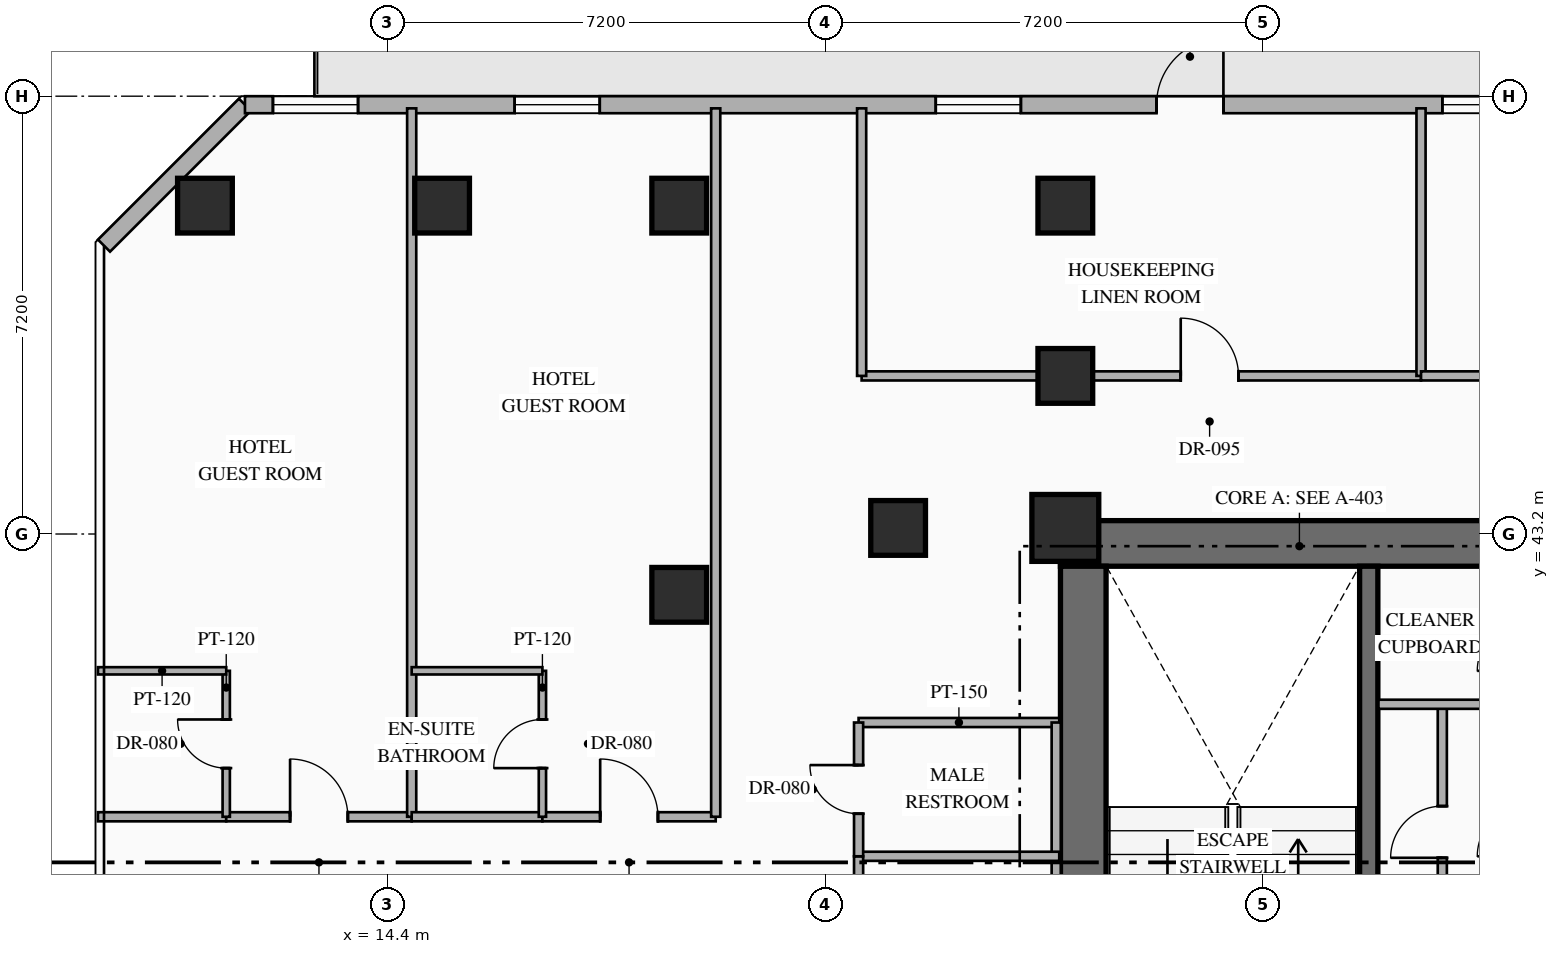
"""IFC4 building model, lengths in metres.
Left out: names, types, materials, properties, quantities, classifications, styles, units other than length and angle.
Written with IfcOpenShell. Run it as: python <this file> out.ifc"""

import sys

from ifc_helpers import new_model, si_unit, direction, frame, frame_2d, origin, origin_2d, place, context, subcontext, project, spatial, rectangle, hollow_rectangle, extrude, element, fill, save


model = new_model("IFC4")
c1 = context("Model", 3, precision=1e-05, world=origin(), true_north=direction((0.0, 1.0)))
c2 = subcontext(c1, "Body", "Model", "MODEL_VIEW")
j1 = project(units=[si_unit("LENGTHUNIT", "METRE"), si_unit("PLANEANGLEUNIT", "RADIAN")], contexts=[c1])
p1 = place(None, origin())
s1 = spatial("IfcSite", under=j1, at=p1, CompositionType="ELEMENT")
p2 = place(p1, origin())
s2 = spatial("IfcBuilding", under=s1, at=p2, CompositionType="ELEMENT")
p3 = place(p2, frame((0.0, 0.0, 74.6)))
s3 = spatial("IfcBuildingStorey", under=s2, at=p3, CompositionType="ELEMENT", Elevation=74.6)
p4 = place(p3, frame((25.47, 43.045, 0.0), z_axis=(0.0, 0.0, 1.0), x_axis=(1.0, 0.0, 0.0)))
e1 = element("IfcWall", 1, at=p4, inside=s3, PredefinedType="SHEAR", context=c2, shape_type="SweptSolid", body=[
    extrude(rectangle(XDim=8.08, YDim=0.75, at=frame_2d((4.04, 0.0))), origin(), (0.0, 0.0, 1.0), 3.35),
])
p5 = place(p3, frame((25.845, 33.19, 0.0), z_axis=(0.0, 0.0, 1.0), x_axis=(0.0, 1.0, 0.0)))
e2 = element("IfcWall", 2, at=p5, inside=s3, PredefinedType="SHEAR", context=c2, shape_type="SweptSolid", body=[
    extrude(rectangle(XDim=9.48, YDim=0.75, at=frame_2d((4.74, 0.0))), origin(), (0.0, 0.0, 1.0), 3.35),
])
p6 = place(p3, frame((30.54, 33.19, 0.0), z_axis=(0.0, 0.0, 1.0), x_axis=(0.0, 1.0, 0.0)))
e3 = element("IfcWall", 3, at=p6, inside=s3, PredefinedType="SHEAR", context=c2, shape_type="SweptSolid", body=[
    extrude(rectangle(XDim=9.48, YDim=0.3, at=frame_2d((4.74, 0.0))), origin(), (0.0, 0.0, 1.0), 3.35),
])
p7 = place(p3, frame((25.55, 43.3, 0.0), z_axis=(0.0, 0.0, 1.0), x_axis=(1.0, 0.0, 0.0)))
e4 = element("IfcColumn", 4, at=p7, inside=s3, PredefinedType="COLUMN", context=c2, shape_type="SweptSolid", body=[
    extrude(rectangle(XDim=1.1, YDim=1.1, at=origin_2d()), origin(), (0.0, 0.0, 1.0), 3.35),
])
for number, where, z_axis, x_axis in (
    (5, (25.55, 45.8, 0.0), (0.0, 0.0, 1.0), (1.0, 0.0, 0.0)),
    (6, (11.4, 48.6, 0.0), (0.0, 0.0, 1.0), (1.0, 0.0, 0.0)),
    (7, (19.2, 48.6, 0.0), (0.0, 0.0, 1.0), (1.0, 0.0, 0.0)),
    (8, (25.55, 48.6, 0.0), (0.0, 0.0, 1.0), (1.0, 0.0, 0.0)),
    (9, (19.2, 42.2, 0.0), (0.0, 0.0, 1.0), (1.0, 0.0, 0.0)),
    (10, (22.8, 43.3, 0.0), (0.0, 0.0, 1.0), (1.0, 0.0, 0.0)),
    (11, (15.3, 48.6, 0.0), (0.0, 0.0, 1.0), (1.0, 0.0, 0.0)),
):
    element("IfcColumn", number, at=place(p3, frame(where, z_axis=z_axis, x_axis=x_axis)), inside=s3, PredefinedType="COLUMN", context=c2, shape_type="SweptSolid", body=[
        extrude(hollow_rectangle(XDim=0.9, YDim=0.9, WallThickness=0.036, at=origin_2d()), origin(), (0.0, 0.0, 1.0), 3.35),
    ])
p8 = place(p3, frame((9.74, 47.942, 0.0), z_axis=(0.0, 0.0, 1.0), x_axis=(0.707106781187, 0.707106781187, 0.0)))
e12 = element("IfcWall", 12, at=p8, inside=s3, PredefinedType="STANDARD", context=c2, shape_type="SweptSolid", body=[
    extrude(rectangle(XDim=3.278, YDim=0.28, at=frame_2d((1.639, 0.0))), origin(), (0.0, 0.0, 1.0), 3.13),
])
p9 = place(p3, frame((12.058, 50.26, 0.0), z_axis=(0.0, 0.0, 1.0), x_axis=(1.0, 0.0, 0.0)))
e13 = element("IfcWall", 13, at=p9, inside=s3, PredefinedType="STANDARD", context=c2, shape_type="SweptSolid", body=[
    extrude(rectangle(XDim=30.484, YDim=0.28, at=frame_2d((15.242, 0.0))), origin(), (0.0, 0.0, 1.0), 3.13),
])
p10 = place(p9, frame((14.992, 0.0, 0.0)))
e14 = element("IfcOpeningElement", 14, at=p10, cuts=e13, PredefinedType="OPENING", context=c2, shape_type="SweptSolid", body=[
    extrude(rectangle(XDim=1.1, YDim=2.2, at=frame_2d((0.55, 1.1))), frame((0.0, 0.15, 0.0), z_axis=(0.0, -1.0, 0.0), x_axis=(1.0, 0.0, 0.0)), (0.0, 0.0, 1.0), 0.3),
])
p11 = place(p9, frame((0.46, 0.0, 0.85)))
e15 = element("IfcOpeningElement", 15, at=p11, cuts=e13, PredefinedType="OPENING", context=c2, shape_type="SweptSolid", body=[
    extrude(rectangle(XDim=1.4, YDim=1.8, at=frame_2d((0.7, 0.9))), frame((0.0, 0.15, 0.0), z_axis=(0.0, -1.0, 0.0), x_axis=(1.0, 0.0, 0.0)), (0.0, 0.0, 1.0), 0.3),
])
p12 = place(p9, frame((4.435, 0.0, 0.85)))
e16 = element("IfcOpeningElement", 16, at=p12, cuts=e13, PredefinedType="OPENING", context=c2, shape_type="SweptSolid", body=[
    extrude(rectangle(XDim=1.4, YDim=1.8, at=frame_2d((0.7, 0.9))), frame((0.0, 0.15, 0.0), z_axis=(0.0, -1.0, 0.0), x_axis=(1.0, 0.0, 0.0)), (0.0, 0.0, 1.0), 0.3),
])
p13 = place(p9, frame((11.361, 0.0, 0.85)))
e17 = element("IfcOpeningElement", 17, at=p13, cuts=e13, PredefinedType="OPENING", context=c2, shape_type="SweptSolid", body=[
    extrude(rectangle(XDim=1.4, YDim=1.8, at=frame_2d((0.7, 0.9))), frame((0.0, 0.15, 0.0), z_axis=(0.0, -1.0, 0.0), x_axis=(1.0, 0.0, 0.0)), (0.0, 0.0, 1.0), 0.3),
])
p14 = place(p9, frame((19.693, 0.0, 0.85)))
e18 = element("IfcOpeningElement", 18, at=p14, cuts=e13, PredefinedType="OPENING", context=c2, shape_type="SweptSolid", body=[
    extrude(rectangle(XDim=1.4, YDim=1.8, at=frame_2d((0.7, 0.9))), frame((0.0, 0.15, 0.0), z_axis=(0.0, -1.0, 0.0), x_axis=(1.0, 0.0, 0.0)), (0.0, 0.0, 1.0), 0.3),
])
p15 = place(p9, frame((23.252, 0.0, 0.85)))
e19 = element("IfcOpeningElement", 19, at=p15, cuts=e13, PredefinedType="OPENING", context=c2, shape_type="SweptSolid", body=[
    extrude(rectangle(XDim=1.4, YDim=1.8, at=frame_2d((0.7, 0.9))), frame((0.0, 0.15, 0.0), z_axis=(0.0, -1.0, 0.0), x_axis=(1.0, 0.0, 0.0)), (0.0, 0.0, 1.0), 0.3),
])
p16 = place(p9, frame((27.417, 0.0, 0.85)))
e20 = element("IfcOpeningElement", 20, at=p16, cuts=e13, PredefinedType="OPENING", context=c2, shape_type="SweptSolid", body=[
    extrude(rectangle(XDim=1.4, YDim=1.8, at=frame_2d((0.7, 0.9))), frame((0.0, 0.15, 0.0), z_axis=(0.0, -1.0, 0.0), x_axis=(1.0, 0.0, 0.0)), (0.0, 0.0, 1.0), 0.3),
])
p17 = place(p3, frame((31.75, 36.18, 0.0), z_axis=(0.0, 0.0, 1.0), x_axis=(0.0, 1.0, 0.0)))
e21 = element("IfcWall", 21, at=p17, inside=s3, PredefinedType="PARTITIONING", context=c2, shape_type="SweptSolid", body=[
    extrude(rectangle(XDim=4.24, YDim=0.15, at=frame_2d((2.12, 0.0))), origin(), (0.0, 0.0, 1.0), 3.13),
])
p18 = place(p17, frame((1.695, 0.0, 0.0)))
e22 = element("IfcOpeningElement", 22, at=p18, cuts=e21, PredefinedType="OPENING", context=c2, shape_type="SweptSolid", body=[
    extrude(rectangle(XDim=0.85, YDim=2.08, at=frame_2d((0.425, 1.04))), frame((0.0, 0.085, 0.0), z_axis=(0.0, -1.0, 0.0), x_axis=(1.0, 0.0, 0.0)), (0.0, 0.0, 1.0), 0.17),
])
p19 = place(p3, frame((30.7, 40.4, 0.0), z_axis=(0.0, 0.0, 1.0), x_axis=(1.0, 0.0, 0.0)))
e23 = element("IfcWall", 23, at=p19, inside=s3, PredefinedType="PARTITIONING", context=c2, shape_type="SweptSolid", body=[
    extrude(rectangle(XDim=2.1, YDim=0.15, at=frame_2d((1.05, 0.0))), origin(), (0.0, 0.0, 1.0), 3.13),
])
p20 = place(p3, frame((22.15, 40.1, 0.0), z_axis=(0.0, 0.0, 1.0), x_axis=(1.0, 0.0, 0.0)))
e24 = element("IfcWall", 24, at=p20, inside=s3, PredefinedType="PARTITIONING", context=c2, shape_type="SweptSolid", body=[
    extrude(rectangle(XDim=3.3, YDim=0.15, at=frame_2d((1.65, 0.0))), origin(), (0.0, 0.0, 1.0), 3.13),
])
p21 = place(p3, frame((25.4, 33.5, 0.0), z_axis=(0.0, 0.0, 1.0), x_axis=(0.0, 1.0, 0.0)))
e25 = element("IfcWall", 25, at=p21, inside=s3, PredefinedType="PARTITIONING", context=c2, shape_type="SweptSolid", body=[
    extrude(rectangle(XDim=6.6, YDim=0.15, at=frame_2d((3.3, 0.0))), origin(), (0.0, 0.0, 1.0), 3.13),
])
p22 = place(p3, frame((22.15, 37.9, 0.0), z_axis=(0.0, 0.0, 1.0), x_axis=(1.0, 0.0, 0.0)))
e26 = element("IfcWall", 26, at=p22, inside=s3, PredefinedType="PARTITIONING", context=c2, shape_type="SweptSolid", body=[
    extrude(rectangle(XDim=3.3, YDim=0.15, at=frame_2d((1.65, 0.0))), origin(), (0.0, 0.0, 1.0), 3.13),
])
p23 = place(p3, frame((22.15, 35.7, 0.0), z_axis=(0.0, 0.0, 1.0), x_axis=(0.0, 1.0, 0.0)))
e27 = element("IfcWall", 27, at=p23, inside=s3, PredefinedType="PARTITIONING", context=c2, shape_type="SweptSolid", body=[
    extrude(rectangle(XDim=2.2, YDim=0.15, at=frame_2d((1.1, 0.0))), origin(), (0.0, 0.0, 1.0), 3.13),
])
p24 = place(p23, frame((0.7, 0.0, 0.0)))
e28 = element("IfcOpeningElement", 28, at=p24, cuts=e27, PredefinedType="OPENING", context=c2, shape_type="SweptSolid", body=[
    extrude(rectangle(XDim=0.8, YDim=2.06, at=frame_2d((0.4, 1.03))), frame((0.0, 0.085, 0.0), z_axis=(0.0, -1.0, 0.0), x_axis=(1.0, 0.0, 0.0)), (0.0, 0.0, 1.0), 0.17),
])
p25 = place(p3, frame((22.15, 37.9, 0.0), z_axis=(0.0, 0.0, 1.0), x_axis=(0.0, 1.0, 0.0)))
e29 = element("IfcWall", 29, at=p25, inside=s3, PredefinedType="PARTITIONING", context=c2, shape_type="SweptSolid", body=[
    extrude(rectangle(XDim=2.2, YDim=0.15, at=frame_2d((1.1, 0.0))), origin(), (0.0, 0.0, 1.0), 3.13),
])
p26 = place(p25, frame((0.7, 0.0, 0.0)))
e30 = element("IfcOpeningElement", 30, at=p26, cuts=e29, PredefinedType="OPENING", context=c2, shape_type="SweptSolid", body=[
    extrude(rectangle(XDim=0.8, YDim=2.06, at=frame_2d((0.4, 1.03))), frame((0.0, 0.085, 0.0), z_axis=(0.0, -1.0, 0.0), x_axis=(1.0, 0.0, 0.0)), (0.0, 0.0, 1.0), 0.17),
])
p27 = place(p3, frame((22.2, 45.8, 0.0), z_axis=(0.0, 0.0, 1.0), x_axis=(1.0, 0.0, 0.0)))
e31 = element("IfcWall", 31, at=p27, inside=s3, PredefinedType="PARTITIONING", context=c2, shape_type="SweptSolid", body=[
    extrude(rectangle(XDim=9.2, YDim=0.15, at=frame_2d((4.6, 0.0))), origin(), (0.0, 0.0, 1.0), 2.425),
])
p28 = place(p27, frame((5.248, 0.0, 0.0)))
e32 = element("IfcOpeningElement", 32, at=p28, cuts=e31, PredefinedType="OPENING", context=c2, shape_type="SweptSolid", body=[
    extrude(rectangle(XDim=0.95, YDim=2.15, at=frame_2d((0.475, 1.075))), frame((0.0, 0.085, 0.0), z_axis=(0.0, -1.0, 0.0), x_axis=(1.0, 0.0, 0.0)), (0.0, 0.0, 1.0), 0.17),
])
for number, where, z_axis, x_axis in (
    (33, (22.2, 45.8, 0.0), (0.0, 0.0, 1.0), (0.0, 1.0, 0.0)),
    (34, (31.4, 45.8, 0.0), (0.0, 0.0, 1.0), (0.0, 1.0, 0.0)),
):
    element("IfcWall", number, at=place(p3, frame(where, z_axis=z_axis, x_axis=x_axis)), inside=s3, PredefinedType="PARTITIONING", context=c2, shape_type="SweptSolid", body=[
        extrude(rectangle(XDim=4.4, YDim=0.15, at=frame_2d((2.2, 0.0))), origin(), (0.0, 0.0, 1.0), 3.13),
    ])
p29 = place(p3, frame((31.4, 45.8, 0.0), z_axis=(0.0, 0.0, 1.0), x_axis=(1.0, 0.0, 0.0)))
e35 = element("IfcWall", 35, at=p29, inside=s3, PredefinedType="PARTITIONING", context=c2, shape_type="SweptSolid", body=[
    extrude(rectangle(XDim=13.0, YDim=0.15, at=frame_2d((6.5, 0.0))), origin(), (0.0, 0.0, 1.0), 2.425),
])
p30 = place(p29, frame((6.025, 0.0, 0.0)))
e36 = element("IfcOpeningElement", 36, at=p30, cuts=e35, PredefinedType="OPENING", context=c2, shape_type="SweptSolid", body=[
    extrude(rectangle(XDim=0.95, YDim=2.15, at=frame_2d((0.475, 1.075))), frame((0.0, 0.085, 0.0), z_axis=(0.0, -1.0, 0.0), x_axis=(1.0, 0.0, 0.0)), (0.0, 0.0, 1.0), 0.17),
])
p31 = place(p3, frame((9.64, 38.55, 0.0), z_axis=(0.0, 0.0, 1.0), x_axis=(1.0, 0.0, 0.0)))
e37 = element("IfcWall", 37, at=p31, inside=s3, PredefinedType="PARTITIONING", context=c2, shape_type="SweptSolid", body=[
    extrude(rectangle(XDim=2.11, YDim=0.15, at=frame_2d((1.055, 0.0))), origin(), (0.0, 0.0, 1.0), 2.775),
])
p32 = place(p3, frame((11.75, 38.55, 0.0), z_axis=(0.0, 0.0, 1.0), x_axis=(1.0, 0.0, 0.0)))
e38 = element("IfcWall", 38, at=p32, inside=s3, PredefinedType="PARTITIONING", context=c2, shape_type="SweptSolid", body=[
    extrude(rectangle(XDim=3.05, YDim=0.15, at=frame_2d((1.525, 0.0))), origin(), (0.0, 0.0, 1.0), 2.775),
])
p33 = place(p32, frame((1.05, 0.0, 0.0)))
e39 = element("IfcOpeningElement", 39, at=p33, cuts=e38, PredefinedType="OPENING", context=c2, shape_type="SweptSolid", body=[
    extrude(rectangle(XDim=0.95, YDim=2.15, at=frame_2d((0.475, 1.075))), frame((0.0, 0.085, 0.0), z_axis=(0.0, -1.0, 0.0), x_axis=(1.0, 0.0, 0.0)), (0.0, 0.0, 1.0), 0.17),
])
p34 = place(p3, frame((11.75, 38.55, 0.0), z_axis=(0.0, 0.0, 1.0), x_axis=(0.0, 1.0, 0.0)))
e40 = element("IfcWall", 40, at=p34, inside=s3, PredefinedType="PARTITIONING", context=c2, shape_type="SweptSolid", body=[
    extrude(rectangle(XDim=2.4, YDim=0.12, at=frame_2d((1.2, 0.0))), origin(), (0.0, 0.0, 1.0), 3.13),
])
p35 = place(p34, frame((0.8, 0.0, 0.0)))
e41 = element("IfcOpeningElement", 41, at=p35, cuts=e40, PredefinedType="OPENING", context=c2, shape_type="SweptSolid", body=[
    extrude(rectangle(XDim=0.8, YDim=2.06, at=frame_2d((0.4, 1.03))), frame((0.0, 0.07, 0.0), z_axis=(0.0, -1.0, 0.0), x_axis=(1.0, 0.0, 0.0)), (0.0, 0.0, 1.0), 0.14),
])
p36 = place(p3, frame((9.64, 40.95, 0.0), z_axis=(0.0, 0.0, 1.0), x_axis=(1.0, 0.0, 0.0)))
e42 = element("IfcWall", 42, at=p36, inside=s3, PredefinedType="PARTITIONING", context=c2, shape_type="SweptSolid", body=[
    extrude(rectangle(XDim=2.11, YDim=0.12, at=frame_2d((1.055, 0.0))), origin(), (0.0, 0.0, 1.0), 2.775),
])
p37 = place(p3, frame((14.8, 38.55, 0.0), z_axis=(0.0, 0.0, 1.0), x_axis=(0.0, 1.0, 0.0)))
e43 = element("IfcWall", 43, at=p37, inside=s3, PredefinedType="PARTITIONING", context=c2, shape_type="SweptSolid", body=[
    extrude(rectangle(XDim=11.65, YDim=0.15, at=frame_2d((5.825, 0.0))), origin(), (0.0, 0.0, 1.0), 3.13),
])
p38 = place(p3, frame((14.8, 38.55, 0.0), z_axis=(0.0, 0.0, 1.0), x_axis=(1.0, 0.0, 0.0)))
e44 = element("IfcWall", 44, at=p38, inside=s3, PredefinedType="PARTITIONING", context=c2, shape_type="SweptSolid", body=[
    extrude(rectangle(XDim=2.15, YDim=0.15, at=frame_2d((1.075, 0.0))), origin(), (0.0, 0.0, 1.0), 2.775),
])
p39 = place(p3, frame((16.95, 38.55, 0.0), z_axis=(0.0, 0.0, 1.0), x_axis=(1.0, 0.0, 0.0)))
e45 = element("IfcWall", 45, at=p39, inside=s3, PredefinedType="PARTITIONING", context=c2, shape_type="SweptSolid", body=[
    extrude(rectangle(XDim=2.85, YDim=0.15, at=frame_2d((1.425, 0.0))), origin(), (0.0, 0.0, 1.0), 2.775),
])
p40 = place(p39, frame((0.95, 0.0, 0.0)))
e46 = element("IfcOpeningElement", 46, at=p40, cuts=e45, PredefinedType="OPENING", context=c2, shape_type="SweptSolid", body=[
    extrude(rectangle(XDim=0.95, YDim=2.15, at=frame_2d((0.475, 1.075))), frame((0.0, 0.085, 0.0), z_axis=(0.0, -1.0, 0.0), x_axis=(1.0, 0.0, 0.0)), (0.0, 0.0, 1.0), 0.17),
])
p41 = place(p3, frame((16.95, 38.55, 0.0), z_axis=(0.0, 0.0, 1.0), x_axis=(0.0, 1.0, 0.0)))
e47 = element("IfcWall", 47, at=p41, inside=s3, PredefinedType="PARTITIONING", context=c2, shape_type="SweptSolid", body=[
    extrude(rectangle(XDim=2.4, YDim=0.12, at=frame_2d((1.2, 0.0))), origin(), (0.0, 0.0, 1.0), 3.13),
])
p42 = place(p41, frame((0.8, 0.0, 0.0)))
e48 = element("IfcOpeningElement", 48, at=p42, cuts=e47, PredefinedType="OPENING", context=c2, shape_type="SweptSolid", body=[
    extrude(rectangle(XDim=0.8, YDim=2.06, at=frame_2d((0.4, 1.03))), frame((0.0, 0.07, 0.0), z_axis=(0.0, -1.0, 0.0), x_axis=(1.0, 0.0, 0.0)), (0.0, 0.0, 1.0), 0.14),
])
p43 = place(p3, frame((14.8, 40.95, 0.0), z_axis=(0.0, 0.0, 1.0), x_axis=(1.0, 0.0, 0.0)))
e49 = element("IfcWall", 49, at=p43, inside=s3, PredefinedType="PARTITIONING", context=c2, shape_type="SweptSolid", body=[
    extrude(rectangle(XDim=2.15, YDim=0.12, at=frame_2d((1.075, 0.0))), origin(), (0.0, 0.0, 1.0), 2.775),
])
p44 = place(p3, frame((19.8, 38.55, 0.0), z_axis=(0.0, 0.0, 1.0), x_axis=(0.0, 1.0, 0.0)))
e50 = element("IfcWall", 50, at=p44, inside=s3, PredefinedType="PARTITIONING", context=c2, shape_type="SweptSolid", body=[
    extrude(rectangle(XDim=11.65, YDim=0.15, at=frame_2d((5.825, 0.0))), origin(), (0.0, 0.0, 1.0), 3.13),
])
p45 = place(p10, origin())
e51 = element("IfcDoor", 51, at=p45, inside=s3, OperationType="SINGLE_SWING_RIGHT", PredefinedType="DOOR", context=c2, shape_type="SweptSolid", body=[
    extrude(rectangle(XDim=1.1, YDim=2.2, at=frame_2d((0.55, 1.1))), frame((0.0, 0.025, 0.0), z_axis=(0.0, -1.0, 0.0), x_axis=(1.0, 0.0, 0.0)), (0.0, 0.0, 1.0), 0.05),
])
fill(e14, e51)
p46 = place(p11, origin())
e52 = element("IfcWindow", 52, at=p46, inside=s3, PartitioningType="SINGLE_PANEL", PredefinedType="WINDOW", context=c2, shape_type="SweptSolid", body=[
    extrude(rectangle(XDim=1.4, YDim=1.8, at=frame_2d((0.7, 0.9))), frame((0.0, 0.03, 0.0), z_axis=(0.0, -1.0, 0.0), x_axis=(1.0, 0.0, 0.0)), (0.0, 0.0, 1.0), 0.06),
])
fill(e15, e52)
p47 = place(p12, origin())
e53 = element("IfcWindow", 53, at=p47, inside=s3, PartitioningType="SINGLE_PANEL", PredefinedType="WINDOW", context=c2, shape_type="SweptSolid", body=[
    extrude(rectangle(XDim=1.4, YDim=1.8, at=frame_2d((0.7, 0.9))), frame((0.0, 0.03, 0.0), z_axis=(0.0, -1.0, 0.0), x_axis=(1.0, 0.0, 0.0)), (0.0, 0.0, 1.0), 0.06),
])
fill(e16, e53)
p48 = place(p13, origin())
e54 = element("IfcWindow", 54, at=p48, inside=s3, PartitioningType="SINGLE_PANEL", PredefinedType="WINDOW", context=c2, shape_type="SweptSolid", body=[
    extrude(rectangle(XDim=1.4, YDim=1.8, at=frame_2d((0.7, 0.9))), frame((0.0, 0.03, 0.0), z_axis=(0.0, -1.0, 0.0), x_axis=(1.0, 0.0, 0.0)), (0.0, 0.0, 1.0), 0.06),
])
fill(e17, e54)
p49 = place(p14, origin())
e55 = element("IfcWindow", 55, at=p49, inside=s3, PartitioningType="SINGLE_PANEL", PredefinedType="WINDOW", context=c2, shape_type="SweptSolid", body=[
    extrude(rectangle(XDim=1.4, YDim=1.8, at=frame_2d((0.7, 0.9))), frame((0.0, 0.03, 0.0), z_axis=(0.0, -1.0, 0.0), x_axis=(1.0, 0.0, 0.0)), (0.0, 0.0, 1.0), 0.06),
])
fill(e18, e55)
p50 = place(p18, origin())
e56 = element("IfcDoor", 56, at=p50, inside=s3, OperationType="SINGLE_SWING_LEFT", PredefinedType="DOOR", context=c2, shape_type="SweptSolid", body=[
    extrude(rectangle(XDim=0.85, YDim=2.08, at=frame_2d((0.425, 1.04))), frame((0.0, 0.025, 0.0), z_axis=(0.0, -1.0, 0.0), x_axis=(1.0, 0.0, 0.0)), (0.0, 0.0, 1.0), 0.05),
])
fill(e22, e56)
p51 = place(p26, origin())
e57 = element("IfcDoor", 57, at=p51, inside=s3, OperationType="SINGLE_SWING_RIGHT", PredefinedType="DOOR", context=c2, shape_type="SweptSolid", body=[
    extrude(rectangle(XDim=0.8, YDim=2.06, at=frame_2d((0.4, 1.03))), frame((0.0, 0.025, 0.0), z_axis=(0.0, -1.0, 0.0), x_axis=(1.0, 0.0, 0.0)), (0.0, 0.0, 1.0), 0.05),
])
fill(e30, e57)
p52 = place(p28, origin())
e58 = element("IfcDoor", 58, at=p52, inside=s3, OperationType="SINGLE_SWING_LEFT", PredefinedType="DOOR", context=c2, shape_type="SweptSolid", body=[
    extrude(rectangle(XDim=0.95, YDim=2.15, at=frame_2d((0.475, 1.075))), frame((0.0, 0.025, 0.0), z_axis=(0.0, -1.0, 0.0), x_axis=(1.0, 0.0, 0.0)), (0.0, 0.0, 1.0), 0.05),
])
fill(e32, e58)
p53 = place(p33, origin())
e59 = element("IfcDoor", 59, at=p53, inside=s3, OperationType="SINGLE_SWING_LEFT", PredefinedType="DOOR", context=c2, shape_type="SweptSolid", body=[
    extrude(rectangle(XDim=0.95, YDim=2.15, at=frame_2d((0.475, 1.075))), frame((0.0, 0.025, 0.0), z_axis=(0.0, -1.0, 0.0), x_axis=(1.0, 0.0, 0.0)), (0.0, 0.0, 1.0), 0.05),
])
fill(e39, e59)
p54 = place(p35, origin())
e60 = element("IfcDoor", 60, at=p54, inside=s3, OperationType="SINGLE_SWING_RIGHT", PredefinedType="DOOR", context=c2, shape_type="SweptSolid", body=[
    extrude(rectangle(XDim=0.8, YDim=2.06, at=frame_2d((0.4, 1.03))), frame((0.0, 0.025, 0.0), z_axis=(0.0, -1.0, 0.0), x_axis=(1.0, 0.0, 0.0)), (0.0, 0.0, 1.0), 0.05),
])
fill(e41, e60)
p55 = place(p40, origin())
e61 = element("IfcDoor", 61, at=p55, inside=s3, OperationType="SINGLE_SWING_LEFT", PredefinedType="DOOR", context=c2, shape_type="SweptSolid", body=[
    extrude(rectangle(XDim=0.95, YDim=2.15, at=frame_2d((0.475, 1.075))), frame((0.0, 0.025, 0.0), z_axis=(0.0, -1.0, 0.0), x_axis=(1.0, 0.0, 0.0)), (0.0, 0.0, 1.0), 0.05),
])
fill(e46, e61)
p56 = place(p42, origin())
e62 = element("IfcDoor", 62, at=p56, inside=s3, OperationType="SINGLE_SWING_LEFT", PredefinedType="DOOR", context=c2, shape_type="SweptSolid", body=[
    extrude(rectangle(XDim=0.8, YDim=2.06, at=frame_2d((0.4, 1.03))), frame((0.0, 0.025, 0.0), z_axis=(0.0, -1.0, 0.0), x_axis=(1.0, 0.0, 0.0)), (0.0, 0.0, 1.0), 0.05),
])
fill(e48, e62)
save(model, sys.argv[1])
